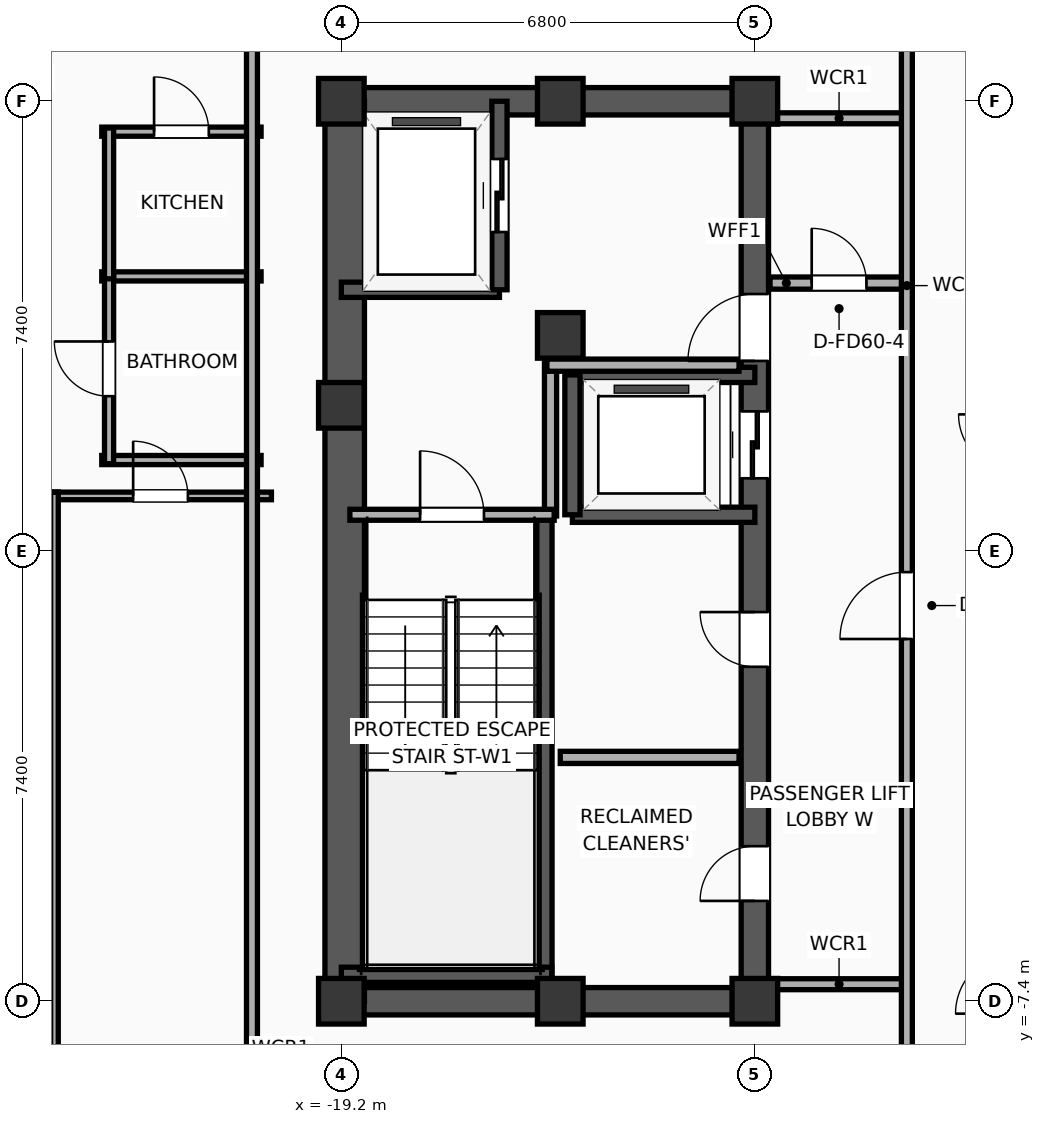
"""IFC4 building model, lengths in metres.
Left out: names, types, materials, properties, quantities, classifications, styles, units other than length and angle.
Written with IfcOpenShell. Run it as: python <this file> out.ifc"""

import sys

from ifc_helpers import new_model, si_unit, direction, frame, frame_2d, origin, origin_2d, place, context, subcontext, project, spatial, rectangle, extrude, element, fill, save


model = new_model("IFC4")
c1 = context("Model", 3, precision=1e-05, world=origin(), true_north=direction((0.0, 1.0)))
c2 = subcontext(c1, "Body", "Model", "MODEL_VIEW")
j1 = project(units=[si_unit("LENGTHUNIT", "METRE"), si_unit("PLANEANGLEUNIT", "RADIAN")], contexts=[c1])
p1 = place(None, origin())
s1 = spatial("IfcSite", under=j1, at=p1, CompositionType="ELEMENT")
p2 = place(p1, origin())
s2 = spatial("IfcBuilding", under=s1, at=p2, CompositionType="ELEMENT")
p3 = place(p2, frame((0.0, 0.0, 263.9)))
s3 = spatial("IfcBuildingStorey", under=s2, at=p3, CompositionType="ELEMENT", Elevation=263.9)
for number, where, z_axis, x_axis in (
    (1, (-19.2, -7.4, 0.0), (0.0, 0.0, 1.0), (1.0, 0.0, 0.0)),
    (2, (-19.2, 2.4, 0.0), (0.0, 0.0, 1.0), (1.0, 0.0, 0.0)),
    (3, (-19.2, 7.4, 0.0), (0.0, 0.0, 1.0), (1.0, 0.0, 0.0)),
    (4, (-15.6, -7.4, 0.0), (0.0, 0.0, 1.0), (1.0, 0.0, 0.0)),
    (5, (-15.6, 7.4, 0.0), (0.0, 0.0, 1.0), (1.0, 0.0, 0.0)),
    (6, (-12.4, -7.4, 0.0), (0.0, 0.0, 1.0), (1.0, 0.0, 0.0)),
    (7, (-15.6, 3.55, 0.0), (0.0, 0.0, 1.0), (1.0, 0.0, 0.0)),
    (8, (-12.4, 7.4, 0.0), (0.0, 0.0, 1.0), (1.0, 0.0, 0.0)),
):
    element("IfcColumn", number, at=place(p3, frame(where, z_axis=z_axis, x_axis=x_axis)), inside=s3, PredefinedType="COLUMN", context=c2, shape_type="SweptSolid", body=[
        extrude(rectangle(XDim=0.75, YDim=0.75, at=origin_2d()), origin(), (0.0, 0.0, 1.0), 3.9),
    ])
for number, where, z_axis, x_axis in (
    (9, (-19.425, -7.4, 0.0), (0.0, 0.0, 1.0), (1.0, 0.0, 0.0)),
    (10, (-19.425, 7.4, 0.0), (0.0, 0.0, 1.0), (1.0, 0.0, 0.0)),
):
    element("IfcWall", number, at=place(p3, frame(where, z_axis=z_axis, x_axis=x_axis)), inside=s3, PredefinedType="SHEAR", context=c2, shape_type="SweptSolid", body=[
        extrude(rectangle(XDim=7.25, YDim=0.45, at=frame_2d((3.625, 0.0))), origin(), (0.0, 0.0, 1.0), 3.65),
    ])
p4 = place(p3, frame((-19.145, -7.4, 0.0), z_axis=(0.0, 0.0, 1.0), x_axis=(0.0, 1.0, 0.0)))
e11 = element("IfcWall", 11, at=p4, inside=s3, PredefinedType="SHEAR", context=c2, shape_type="SweptSolid", body=[
    extrude(rectangle(XDim=14.8, YDim=0.65, at=frame_2d((7.4, 0.0))), origin(), (0.0, 0.0, 1.0), 3.65),
])
p5 = place(p3, frame((-12.4, -7.4, 0.0), z_axis=(0.0, 0.0, 1.0), x_axis=(0.0, 1.0, 0.0)))
e12 = element("IfcWall", 12, at=p5, inside=s3, PredefinedType="SHEAR", context=c2, shape_type="SweptSolid", body=[
    extrude(rectangle(XDim=14.8, YDim=0.45, at=frame_2d((7.4, 0.0))), origin(), (0.0, 0.0, 1.0), 3.65),
])
p6 = place(p5, frame((8.6, 0.0, 0.0)))
e13 = element("IfcOpeningElement", 13, at=p6, cuts=e12, PredefinedType="OPENING", context=c2, shape_type="SweptSolid", body=[
    extrude(rectangle(XDim=1.1, YDim=2.05, at=frame_2d((0.55, 1.025))), frame((0.0, 0.235, 0.0), z_axis=(0.0, -1.0, 0.0), x_axis=(1.0, 0.0, 0.0)), (0.0, 0.0, 1.0), 0.47),
])
p7 = place(p5, frame((10.53, 0.0, 0.0)))
e14 = element("IfcOpeningElement", 14, at=p7, cuts=e12, PredefinedType="OPENING", context=c2, shape_type="SweptSolid", body=[
    extrude(rectangle(XDim=1.1, YDim=2.05, at=frame_2d((0.55, 1.025))), frame((0.0, 0.235, 0.0), z_axis=(0.0, -1.0, 0.0), x_axis=(1.0, 0.0, 0.0)), (0.0, 0.0, 1.0), 0.47),
])
p8 = place(p5, frame((1.65, 0.0, 0.0)))
e15 = element("IfcOpeningElement", 15, at=p8, cuts=e12, PredefinedType="OPENING", context=c2, shape_type="SweptSolid", body=[
    extrude(rectangle(XDim=0.9, YDim=2.05, at=frame_2d((0.45, 1.025))), frame((0.0, 0.235, 0.0), z_axis=(0.0, -1.0, 0.0), x_axis=(1.0, 0.0, 0.0)), (0.0, 0.0, 1.0), 0.47),
])
p9 = place(p5, frame((5.5, 0.0, 0.0)))
e16 = element("IfcOpeningElement", 16, at=p9, cuts=e12, PredefinedType="OPENING", context=c2, shape_type="SweptSolid", body=[
    extrude(rectangle(XDim=0.9, YDim=2.05, at=frame_2d((0.45, 1.025))), frame((0.0, 0.235, 0.0), z_axis=(0.0, -1.0, 0.0), x_axis=(1.0, 0.0, 0.0)), (0.0, 0.0, 1.0), 0.47),
])
p10 = place(p3, frame((-15.86, -7.085, 0.0), z_axis=(0.0, 0.0, 1.0), x_axis=(0.0, 1.0, 0.0)))
e17 = element("IfcWall", 17, at=p10, inside=s3, PredefinedType="SOLIDWALL", context=c2, shape_type="SweptSolid", body=[
    extrude(rectangle(XDim=7.685, YDim=0.25, at=frame_2d((3.843, 0.0))), origin(), (0.0, 0.0, 1.0), 3.65),
])
p11 = place(p3, frame((-19.2, -6.965, 0.0), z_axis=(0.0, 0.0, 1.0), x_axis=(1.0, 0.0, 0.0)))
e18 = element("IfcWall", 18, at=p11, inside=s3, PredefinedType="SOLIDWALL", context=c2, shape_type="SweptSolid", body=[
    extrude(rectangle(XDim=3.46, YDim=0.25, at=frame_2d((1.73, 0.0))), origin(), (0.0, 0.0, 1.0), 3.65),
])
p12 = place(p3, frame((-19.2, 4.3, 0.0), z_axis=(0.0, 0.0, 1.0), x_axis=(1.0, 0.0, 0.0)))
e19 = element("IfcWall", 19, at=p12, inside=s3, PredefinedType="SOLIDWALL", context=c2, shape_type="SweptSolid", body=[
    extrude(rectangle(XDim=2.6, YDim=0.25, at=frame_2d((1.3, 0.0))), origin(), (0.0, 0.0, 1.0), 3.65),
])
p13 = place(p3, frame((-16.6, 4.3, 0.0), z_axis=(0.0, 0.0, 1.0), x_axis=(0.0, 1.0, 0.0)))
e20 = element("IfcWall", 20, at=p13, inside=s3, PredefinedType="SOLIDWALL", context=c2, shape_type="SweptSolid", body=[
    extrude(rectangle(XDim=3.1, YDim=0.25, at=frame_2d((1.55, 0.0))), origin(), (0.0, 0.0, 1.0), 3.65),
])
p14 = place(p13, frame((0.95, 0.0, 0.0)))
e21 = element("IfcOpeningElement", 21, at=p14, cuts=e20, PredefinedType="OPENING", context=c2, shape_type="SweptSolid", body=[
    extrude(rectangle(XDim=1.2, YDim=2.05, at=frame_2d((0.6, 1.025))), frame((0.0, 0.135, 0.0), z_axis=(0.0, -1.0, 0.0), x_axis=(1.0, 0.0, 0.0)), (0.0, 0.0, 1.0), 0.27),
])
for number, where, z_axis, x_axis in (
    (22, (-15.4, 0.6, 0.0), (0.0, 0.0, 1.0), (1.0, 0.0, 0.0)),
    (23, (-12.4, 2.9, 0.0), (0.0, 0.0, 1.0), (-1.0, 0.0, 0.0)),
):
    element("IfcWall", number, at=place(p3, frame(where, z_axis=z_axis, x_axis=x_axis)), inside=s3, PredefinedType="SOLIDWALL", context=c2, shape_type="SweptSolid", body=[
        extrude(rectangle(XDim=3.0, YDim=0.25, at=frame_2d((1.5, 0.0))), origin(), (0.0, 0.0, 1.0), 3.65),
    ])
p15 = place(p3, frame((-15.4, 2.9, 0.0), z_axis=(0.0, 0.0, 1.0), x_axis=(0.0, -1.0, 0.0)))
e24 = element("IfcWall", 24, at=p15, inside=s3, PredefinedType="SOLIDWALL", context=c2, shape_type="SweptSolid", body=[
    extrude(rectangle(XDim=2.3, YDim=0.25, at=frame_2d((1.15, 0.0))), origin(), (0.0, 0.0, 1.0), 3.65),
])
p16 = place(p3, frame((-15.76, 0.58, 0.0), z_axis=(0.0, 0.0, 1.0), x_axis=(0.0, 1.0, 0.0)))
e25 = element("IfcWall", 25, at=p16, inside=s3, PredefinedType="PARTITIONING", context=c2, shape_type="SweptSolid", body=[
    extrude(rectangle(XDim=2.52, YDim=0.2, at=frame_2d((1.26, 0.0))), origin(), (0.0, 0.0, 1.0), 3.65),
])
p17 = place(p3, frame((-15.82, 3.06, 0.0), z_axis=(0.0, 0.0, 1.0), x_axis=(1.0, 0.0, 0.0)))
e26 = element("IfcWall", 26, at=p17, inside=s3, PredefinedType="PARTITIONING", context=c2, shape_type="SweptSolid", body=[
    extrude(rectangle(XDim=3.16, YDim=0.2, at=frame_2d((1.58, 0.0))), origin(), (0.0, 0.0, 1.0), 3.65),
])
p18 = place(p3, frame((-19.06, 0.6, 0.0), z_axis=(0.0, 0.0, 1.0), x_axis=(1.0, 0.0, 0.0)))
e27 = element("IfcWall", 27, at=p18, inside=s3, PredefinedType="PARTITIONING", context=c2, shape_type="SweptSolid", body=[
    extrude(rectangle(XDim=3.36, YDim=0.18, at=frame_2d((1.68, 0.0))), origin(), (0.0, 0.0, 1.0), 3.65),
])
p19 = place(p18, frame((1.155, 0.0, 0.0)))
e28 = element("IfcOpeningElement", 28, at=p19, cuts=e27, PredefinedType="OPENING", context=c2, shape_type="SweptSolid", body=[
    extrude(rectangle(XDim=1.05, YDim=2.05, at=frame_2d((0.525, 1.025))), frame((0.0, 0.1, 0.0), z_axis=(0.0, -1.0, 0.0), x_axis=(1.0, 0.0, 0.0)), (0.0, 0.0, 1.0), 0.2),
])
p20 = place(p3, frame((-15.6, -3.39, 0.0), z_axis=(0.0, 0.0, 1.0), x_axis=(1.0, 0.0, 0.0)))
e29 = element("IfcWall", 29, at=p20, inside=s3, PredefinedType="PARTITIONING", context=c2, shape_type="SweptSolid", body=[
    extrude(rectangle(XDim=2.94, YDim=0.2, at=frame_2d((1.47, 0.0))), origin(), (0.0, 0.0, 1.0), 3.65),
])
p21 = place(p3, frame((-12.15, 4.41, 0.0), z_axis=(0.0, 0.0, 1.0), x_axis=(1.0, 0.0, 0.0)))
e30 = element("IfcWall", 30, at=p21, inside=s3, PredefinedType="PARTITIONING", context=c2, shape_type="SweptSolid", body=[
    extrude(rectangle(XDim=2.27, YDim=0.2, at=frame_2d((1.135, 0.0))), origin(), (0.0, 0.0, 1.0), 3.65),
])
p22 = place(p21, frame((0.685, 0.0, 0.0)))
e31 = element("IfcOpeningElement", 31, at=p22, cuts=e30, PredefinedType="OPENING", context=c2, shape_type="SweptSolid", body=[
    extrude(rectangle(XDim=0.9, YDim=2.05, at=frame_2d((0.45, 1.025))), frame((0.0, 0.11, 0.0), z_axis=(0.0, -1.0, 0.0), x_axis=(1.0, 0.0, 0.0)), (0.0, 0.0, 1.0), 0.22),
])
for number, where, z_axis, x_axis in (
    (32, (-12.15, 7.12, 0.0), (0.0, 0.0, 1.0), (1.0, 0.0, 0.0)),
    (33, (-12.15, -7.12, 0.0), (0.0, 0.0, 1.0), (1.0, 0.0, 0.0)),
):
    element("IfcWall", number, at=place(p3, frame(where, z_axis=z_axis, x_axis=x_axis)), inside=s3, PredefinedType="PARTITIONING", context=c2, shape_type="SweptSolid", body=[
        extrude(rectangle(XDim=2.27, YDim=0.18, at=frame_2d((1.135, 0.0))), origin(), (0.0, 0.0, 1.0), 3.65),
    ])
p23 = place(p3, frame((-9.9, -8.93, 0.0), z_axis=(0.0, 0.0, 1.0), x_axis=(0.0, 1.0, 0.0)))
e34 = element("IfcWall", 34, at=p23, inside=s3, PredefinedType="PARTITIONING", context=c2, shape_type="SweptSolid", body=[
    extrude(rectangle(XDim=17.86, YDim=0.18, at=frame_2d((8.93, 0.0))), origin(), (0.0, 0.0, 1.0), 3.65),
])
p24 = place(p23, frame((7.487, 0.0, 0.0)))
e35 = element("IfcOpeningElement", 35, at=p24, cuts=e34, PredefinedType="OPENING", context=c2, shape_type="SweptSolid", body=[
    extrude(rectangle(XDim=1.1, YDim=2.05, at=frame_2d((0.55, 1.025))), frame((0.0, 0.1, 0.0), z_axis=(0.0, -1.0, 0.0), x_axis=(1.0, 0.0, 0.0)), (0.0, 0.0, 1.0), 0.2),
])
p25 = place(p3, frame((-23.14, 6.9, 0.0), z_axis=(0.0, 0.0, 1.0), x_axis=(1.0, 0.0, 0.0)))
e36 = element("IfcWall", 36, at=p25, inside=s3, PredefinedType="PLUMBINGWALL", context=c2, shape_type="SweptSolid", body=[
    extrude(rectangle(XDim=2.62, YDim=0.15, at=frame_2d((1.31, 0.0))), origin(), (0.0, 0.0, 1.0), 3.65),
])
p26 = place(p25, frame((0.86, 0.0, 0.0)))
e37 = element("IfcOpeningElement", 37, at=p26, cuts=e36, PredefinedType="OPENING", context=c2, shape_type="SweptSolid", body=[
    extrude(rectangle(XDim=0.9, YDim=2.05, at=frame_2d((0.45, 1.025))), frame((0.0, 0.085, 0.0), z_axis=(0.0, -1.0, 0.0), x_axis=(1.0, 0.0, 0.0)), (0.0, 0.0, 1.0), 0.17),
])
for number, where, z_axis, x_axis in (
    (38, (-23.14, 4.52, 0.0), (0.0, 0.0, 1.0), (1.0, 0.0, 0.0)),
    (39, (-23.14, 1.5, 0.0), (0.0, 0.0, 1.0), (1.0, 0.0, 0.0)),
):
    element("IfcWall", number, at=place(p3, frame(where, z_axis=z_axis, x_axis=x_axis)), inside=s3, PredefinedType="PLUMBINGWALL", context=c2, shape_type="SweptSolid", body=[
        extrude(rectangle(XDim=2.62, YDim=0.15, at=frame_2d((1.31, 0.0))), origin(), (0.0, 0.0, 1.0), 3.65),
    ])
p27 = place(p3, frame((-23.02, 1.44, 0.0), z_axis=(0.0, 0.0, 1.0), x_axis=(0.0, 1.0, 0.0)))
e40 = element("IfcWall", 40, at=p27, inside=s3, PredefinedType="PLUMBINGWALL", context=c2, shape_type="SweptSolid", body=[
    extrude(rectangle(XDim=3.12, YDim=0.15, at=frame_2d((1.56, 0.0))), origin(), (0.0, 0.0, 1.0), 3.65),
])
p28 = place(p27, frame((1.11, 0.0, 0.0)))
e41 = element("IfcOpeningElement", 41, at=p28, cuts=e40, PredefinedType="OPENING", context=c2, shape_type="SweptSolid", body=[
    extrude(rectangle(XDim=0.9, YDim=2.05, at=frame_2d((0.45, 1.025))), frame((0.0, 0.085, 0.0), z_axis=(0.0, -1.0, 0.0), x_axis=(1.0, 0.0, 0.0)), (0.0, 0.0, 1.0), 0.17),
])
p29 = place(p3, frame((-23.02, 4.48, 0.0), z_axis=(0.0, 0.0, 1.0), x_axis=(0.0, 1.0, 0.0)))
e42 = element("IfcWall", 42, at=p29, inside=s3, PredefinedType="PLUMBINGWALL", context=c2, shape_type="SweptSolid", body=[
    extrude(rectangle(XDim=2.48, YDim=0.15, at=frame_2d((1.24, 0.0))), origin(), (0.0, 0.0, 1.0), 3.65),
])
p30 = place(p3, frame((-27.229, 0.91, 0.0), z_axis=(0.0, 0.0, 1.0), x_axis=(1.0, 0.0, 0.0)))
e43 = element("IfcWall", 43, at=p30, inside=s3, PredefinedType="PARTITIONING", context=c2, shape_type="SweptSolid", body=[
    extrude(rectangle(XDim=3.374, YDim=0.125, at=frame_2d((1.687, 0.0))), origin(), (0.0, 0.0, 1.0), 3.65),
])
p31 = place(p30, frame((1.237, 0.0, 0.0)))
e44 = element("IfcOpeningElement", 44, at=p31, cuts=e43, PredefinedType="OPENING", context=c2, shape_type="SweptSolid", body=[
    extrude(rectangle(XDim=0.9, YDim=2.05, at=frame_2d((0.45, 1.025))), frame((0.0, 0.073, 0.0), z_axis=(0.0, -1.0, 0.0), x_axis=(1.0, 0.0, 0.0)), (0.0, 0.0, 1.0), 0.145),
])
p32 = place(p3, frame((-23.98, 0.91, 0.0), z_axis=(0.0, 0.0, 1.0), x_axis=(1.0, 0.0, 0.0)))
e45 = element("IfcWall", 45, at=p32, inside=s3, PredefinedType="PARTITIONING", context=c2, shape_type="SweptSolid", body=[
    extrude(rectangle(XDim=3.63, YDim=0.125, at=frame_2d((1.815, 0.0))), origin(), (0.0, 0.0, 1.0), 3.65),
])
p33 = place(p32, frame((1.356, 0.0, 0.0)))
e46 = element("IfcOpeningElement", 46, at=p33, cuts=e45, PredefinedType="OPENING", context=c2, shape_type="SweptSolid", body=[
    extrude(rectangle(XDim=0.9, YDim=2.05, at=frame_2d((0.45, 1.025))), frame((0.0, 0.073, 0.0), z_axis=(0.0, -1.0, 0.0), x_axis=(1.0, 0.0, 0.0)), (0.0, 0.0, 1.0), 0.145),
])
p34 = place(p3, frame((-23.918, -9.16, 0.0), z_axis=(0.0, 0.0, 1.0), x_axis=(0.0, 1.0, 0.0)))
e47 = element("IfcWall", 47, at=p34, inside=s3, PredefinedType="PARTITIONING", context=c2, shape_type="SweptSolid", body=[
    extrude(rectangle(XDim=10.13, YDim=0.125, at=frame_2d((5.065, 0.0))), origin(), (0.0, 0.0, 1.0), 3.65),
])
p35 = place(p3, frame((-20.67, -8.96, 0.0), z_axis=(0.0, 0.0, 1.0), x_axis=(0.0, 1.0, 0.0)))
e48 = element("IfcWall", 48, at=p35, inside=s3, PredefinedType="PARTITIONING", context=c2, shape_type="SweptSolid", body=[
    extrude(rectangle(XDim=17.92, YDim=0.18, at=frame_2d((8.96, 0.0))), origin(), (0.0, 0.0, 1.0), 3.65),
])
p36 = place(p14, origin())
e49 = element("IfcDoor", 49, at=p36, inside=s3, OperationType="SLIDING_TO_LEFT", PredefinedType="DOOR", context=c2, shape_type="SweptSolid", body=[
    extrude(rectangle(XDim=1.2, YDim=2.05, at=frame_2d((0.6, 1.025))), frame((0.0, 0.025, 0.0), z_axis=(0.0, -1.0, 0.0), x_axis=(1.0, 0.0, 0.0)), (0.0, 0.0, 1.0), 0.05),
])
fill(e21, e49)
p37 = place(p6, origin())
e50 = element("IfcDoor", 50, at=p37, inside=s3, OperationType="SLIDING_TO_LEFT", PredefinedType="DOOR", context=c2, shape_type="SweptSolid", body=[
    extrude(rectangle(XDim=1.1, YDim=2.05, at=frame_2d((0.55, 1.025))), frame((0.0, 0.025, 0.0), z_axis=(0.0, -1.0, 0.0), x_axis=(1.0, 0.0, 0.0)), (0.0, 0.0, 1.0), 0.05),
])
fill(e13, e50)
p38 = place(p19, origin())
e51 = element("IfcDoor", 51, at=p38, inside=s3, OperationType="SINGLE_SWING_LEFT", PredefinedType="DOOR", context=c2, shape_type="SweptSolid", body=[
    extrude(rectangle(XDim=1.05, YDim=2.05, at=frame_2d((0.525, 1.025))), frame((0.0, 0.025, 0.0), z_axis=(0.0, -1.0, 0.0), x_axis=(1.0, 0.0, 0.0)), (0.0, 0.0, 1.0), 0.05),
])
fill(e28, e51)
p39 = place(p22, origin())
e52 = element("IfcDoor", 52, at=p39, inside=s3, OperationType="SINGLE_SWING_LEFT", PredefinedType="DOOR", context=c2, shape_type="SweptSolid", body=[
    extrude(rectangle(XDim=0.9, YDim=2.05, at=frame_2d((0.45, 1.025))), frame((0.0, 0.025, 0.0), z_axis=(0.0, -1.0, 0.0), x_axis=(1.0, 0.0, 0.0)), (0.0, 0.0, 1.0), 0.05),
])
fill(e31, e52)
p40 = place(p24, origin())
e53 = element("IfcDoor", 53, at=p40, inside=s3, OperationType="SINGLE_SWING_LEFT", PredefinedType="DOOR", context=c2, shape_type="SweptSolid", body=[
    extrude(rectangle(XDim=1.1, YDim=2.05, at=frame_2d((0.55, 1.025))), frame((0.0, 0.025, 0.0), z_axis=(0.0, -1.0, 0.0), x_axis=(1.0, 0.0, 0.0)), (0.0, 0.0, 1.0), 0.05),
])
fill(e35, e53)
p41 = place(p26, origin())
e54 = element("IfcDoor", 54, at=p41, inside=s3, OperationType="SINGLE_SWING_LEFT", PredefinedType="DOOR", context=c2, shape_type="SweptSolid", body=[
    extrude(rectangle(XDim=0.9, YDim=2.05, at=frame_2d((0.45, 1.025))), frame((0.0, 0.025, 0.0), z_axis=(0.0, -1.0, 0.0), x_axis=(1.0, 0.0, 0.0)), (0.0, 0.0, 1.0), 0.05),
])
fill(e37, e54)
p42 = place(p28, origin())
e55 = element("IfcDoor", 55, at=p42, inside=s3, OperationType="SINGLE_SWING_RIGHT", PredefinedType="DOOR", context=c2, shape_type="SweptSolid", body=[
    extrude(rectangle(XDim=0.9, YDim=2.05, at=frame_2d((0.45, 1.025))), frame((0.0, 0.025, 0.0), z_axis=(0.0, -1.0, 0.0), x_axis=(1.0, 0.0, 0.0)), (0.0, 0.0, 1.0), 0.05),
])
fill(e41, e55)
p43 = place(p33, origin())
e56 = element("IfcDoor", 56, at=p43, inside=s3, OperationType="SINGLE_SWING_LEFT", PredefinedType="DOOR", context=c2, shape_type="SweptSolid", body=[
    extrude(rectangle(XDim=0.9, YDim=2.05, at=frame_2d((0.45, 1.025))), frame((0.0, 0.025, 0.0), z_axis=(0.0, -1.0, 0.0), x_axis=(1.0, 0.0, 0.0)), (0.0, 0.0, 1.0), 0.05),
])
fill(e46, e56)
p44 = place(p7, origin())
e57 = element("IfcDoor", 57, at=p44, inside=s3, OperationType="SINGLE_SWING_LEFT", PredefinedType="DOOR", context=c2, shape_type="SweptSolid", body=[
    extrude(rectangle(XDim=1.1, YDim=2.05, at=frame_2d((0.55, 1.025))), frame((0.0, 0.025, 0.0), z_axis=(0.0, -1.0, 0.0), x_axis=(1.0, 0.0, 0.0)), (0.0, 0.0, 1.0), 0.05),
])
fill(e14, e57)
p45 = place(p8, origin())
e58 = element("IfcDoor", 58, at=p45, inside=s3, OperationType="SINGLE_SWING_LEFT", PredefinedType="DOOR", context=c2, shape_type="SweptSolid", body=[
    extrude(rectangle(XDim=0.9, YDim=2.05, at=frame_2d((0.45, 1.025))), frame((0.0, 0.025, 0.0), z_axis=(0.0, -1.0, 0.0), x_axis=(1.0, 0.0, 0.0)), (0.0, 0.0, 1.0), 0.05),
])
fill(e15, e58)
p46 = place(p9, origin())
e59 = element("IfcDoor", 59, at=p46, inside=s3, OperationType="SINGLE_SWING_RIGHT", PredefinedType="DOOR", context=c2, shape_type="SweptSolid", body=[
    extrude(rectangle(XDim=0.9, YDim=2.05, at=frame_2d((0.45, 1.025))), frame((0.0, 0.025, 0.0), z_axis=(0.0, -1.0, 0.0), x_axis=(1.0, 0.0, 0.0)), (0.0, 0.0, 1.0), 0.05),
])
fill(e16, e59)
save(model, sys.argv[1])
